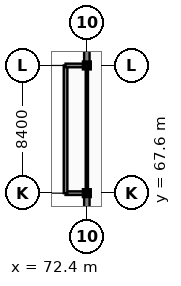
"""IFC4 building model, lengths in metres.
Left out: names, types, materials, properties, quantities, classifications, styles, units other than length and angle.
Written with IfcOpenShell. Run it as: python <this file> out.ifc"""

import sys

from ifc_helpers import new_model, si_unit, direction, frame, frame_2d, origin, origin_2d, place, context, subcontext, project, spatial, rectangle, extrude, element, fill, save


model = new_model("IFC4")
c1 = context("Model", 3, precision=1e-05, world=origin(), true_north=direction((0.0, 1.0)))
c2 = subcontext(c1, "Body", "Model", "MODEL_VIEW")
j1 = project(units=[si_unit("LENGTHUNIT", "METRE"), si_unit("PLANEANGLEUNIT", "RADIAN")], contexts=[c1])
p1 = place(None, origin())
s1 = spatial("IfcSite", under=j1, at=p1, CompositionType="ELEMENT")
p2 = place(p1, origin())
s2 = spatial("IfcBuilding", under=s1, at=p2, CompositionType="ELEMENT")
p3 = place(p2, frame((0.0, 0.0, 13.8)))
s3 = spatial("IfcBuildingStorey", under=s2, at=p3, CompositionType="ELEMENT", Elevation=13.8)
for number, where, z_axis, x_axis in (
    (1, (72.4, 67.6, 0.0), (0.0, 0.0, 1.0), (1.0, 0.0, 0.0)),
    (2, (72.4, 76.0, 0.0), (0.0, 0.0, 1.0), (1.0, 0.0, 0.0)),
):
    element("IfcColumn", number, at=place(p3, frame(where, z_axis=z_axis, x_axis=x_axis)), inside=s3, PredefinedType="COLUMN", context=c2, shape_type="SweptSolid", body=[
        extrude(rectangle(XDim=0.36, YDim=0.36, at=origin_2d()), origin(), (0.0, 0.0, 1.0), 3.9),
    ])
p4 = place(p3, frame((72.4, 67.6, 0.0), z_axis=(0.0, 0.0, 1.0), x_axis=(0.0, 1.0, 0.0)))
e3 = element("IfcWall", 3, at=p4, inside=s3, PredefinedType="PARTITIONING", context=c2, shape_type="SweptSolid", body=[
    extrude(rectangle(XDim=8.4, YDim=0.15, at=frame_2d((4.2, 0.0))), origin(), (0.0, 0.0, 1.0), 3.2),
])
p5 = place(p4, frame((3.7, 0.0, -0.01)))
e4 = element("IfcOpeningElement", 4, at=p5, cuts=e3, PredefinedType="OPENING", context=c2, shape_type="SweptSolid", body=[
    extrude(rectangle(XDim=1.0, YDim=2.16, at=frame_2d((0.5, 1.08))), frame((0.0, 0.085, 0.0), z_axis=(0.0, -1.0, 0.0), x_axis=(1.0, 0.0, 0.0)), (0.0, 0.0, 1.0), 0.17),
])
p6 = place(p3, frame((72.4, 67.6, 0.0), z_axis=(0.0, 0.0, 1.0), x_axis=(0.0, -1.0, 0.0)))
e5 = element("IfcWall", 5, at=p6, inside=s3, PredefinedType="SOLIDWALL", context=c2, shape_type="SweptSolid", body=[
    extrude(rectangle(XDim=8.4, YDim=0.36, at=frame_2d((4.2, 0.0))), origin(), (0.0, 0.0, 1.0), 3.2),
])
p7 = place(p6, frame((0.46, 0.0, 0.75)))
e6 = element("IfcOpeningElement", 6, at=p7, cuts=e5, PredefinedType="OPENING", context=c2, shape_type="SweptSolid", body=[
    extrude(rectangle(XDim=1.55, YDim=2.31, at=frame_2d((0.775, 1.155))), frame((0.0, 0.19, 0.0), z_axis=(0.0, -1.0, 0.0), x_axis=(1.0, 0.0, 0.0)), (0.0, 0.0, 1.0), 0.38),
])
p8 = place(p6, frame((6.26, 0.0, 0.75)))
e7 = element("IfcOpeningElement", 7, at=p8, cuts=e5, PredefinedType="OPENING", context=c2, shape_type="SweptSolid", body=[
    extrude(rectangle(XDim=1.55, YDim=2.31, at=frame_2d((0.775, 1.155))), frame((0.0, 0.19, 0.0), z_axis=(0.0, -1.0, 0.0), x_axis=(1.0, 0.0, 0.0)), (0.0, 0.0, 1.0), 0.38),
])
p9 = place(p3, frame((72.4, 80.8, 0.0), z_axis=(0.0, 0.0, 1.0), x_axis=(0.0, -1.0, 0.0)))
e8 = element("IfcWall", 8, at=p9, inside=s3, PredefinedType="SOLIDWALL", context=c2, shape_type="SweptSolid", body=[
    extrude(rectangle(XDim=4.8, YDim=0.36, at=frame_2d((2.4, 0.0))), origin(), (0.0, 0.0, 1.0), 3.2),
])
p10 = place(p9, frame((0.46, 0.0, 0.75)))
e9 = element("IfcOpeningElement", 9, at=p10, cuts=e8, PredefinedType="OPENING", context=c2, shape_type="SweptSolid", body=[
    extrude(rectangle(XDim=1.55, YDim=2.31, at=frame_2d((0.775, 1.155))), frame((0.0, 0.19, 0.0), z_axis=(0.0, -1.0, 0.0), x_axis=(1.0, 0.0, 0.0)), (0.0, 0.0, 1.0), 0.38),
])
p11 = place(p9, frame((2.66, 0.0, 0.75)))
e10 = element("IfcOpeningElement", 10, at=p11, cuts=e8, PredefinedType="OPENING", context=c2, shape_type="SweptSolid", body=[
    extrude(rectangle(XDim=1.55, YDim=2.31, at=frame_2d((0.775, 1.155))), frame((0.0, 0.19, 0.0), z_axis=(0.0, -1.0, 0.0), x_axis=(1.0, 0.0, 0.0)), (0.0, 0.0, 1.0), 0.38),
])
p12 = place(p3, frame((72.25, 67.6, 0.0), z_axis=(0.0, 0.0, 1.0), x_axis=(-1.0, 0.0, 0.0)))
e11 = element("IfcWall", 11, at=p12, inside=s3, PredefinedType="SOLIDWALL", context=c2, shape_type="SweptSolid", body=[
    extrude(rectangle(XDim=1.25, YDim=0.24, at=frame_2d((0.625, 0.0))), origin(), (0.0, 0.0, 1.0), 3.2),
])
p13 = place(p3, frame((71.0, 67.6, 0.0), z_axis=(0.0, 0.0, 1.0), x_axis=(0.0, 1.0, 0.0)))
e12 = element("IfcWall", 12, at=p13, inside=s3, PredefinedType="SOLIDWALL", context=c2, shape_type="SweptSolid", body=[
    extrude(rectangle(XDim=8.4, YDim=0.24, at=frame_2d((4.2, 0.0))), origin(), (0.0, 0.0, 1.0), 3.2),
])
p14 = place(p13, frame((0.46, 0.0, 0.65)))
e13 = element("IfcOpeningElement", 13, at=p14, cuts=e12, PredefinedType="OPENING", context=c2, shape_type="SweptSolid", body=[
    extrude(rectangle(XDim=2.4, YDim=2.15, at=frame_2d((1.2, 1.075))), frame((0.0, 0.13, 0.0), z_axis=(0.0, -1.0, 0.0), x_axis=(1.0, 0.0, 0.0)), (0.0, 0.0, 1.0), 0.26),
])
p15 = place(p13, frame((5.46, 0.0, 0.65)))
e14 = element("IfcOpeningElement", 14, at=p15, cuts=e12, PredefinedType="OPENING", context=c2, shape_type="SweptSolid", body=[
    extrude(rectangle(XDim=2.4, YDim=2.15, at=frame_2d((1.2, 1.075))), frame((0.0, 0.13, 0.0), z_axis=(0.0, -1.0, 0.0), x_axis=(1.0, 0.0, 0.0)), (0.0, 0.0, 1.0), 0.26),
])
p16 = place(p3, frame((71.0, 76.0, 0.0), z_axis=(0.0, 0.0, 1.0), x_axis=(1.0, 0.0, 0.0)))
e15 = element("IfcWall", 15, at=p16, inside=s3, PredefinedType="SOLIDWALL", context=c2, shape_type="SweptSolid", body=[
    extrude(rectangle(XDim=1.25, YDim=0.24, at=frame_2d((0.625, 0.0))), origin(), (0.0, 0.0, 1.0), 3.2),
])
p17 = place(p5, frame((1.0, 0.0, 0.01), z_axis=(0.0, 0.0, 1.0), x_axis=(-1.0, 0.0, 0.0)))
e16 = element("IfcDoor", 16, at=p17, inside=s3, OperationType="SINGLE_SWING_LEFT", PredefinedType="DOOR", context=c2, shape_type="SweptSolid", body=[
    extrude(rectangle(XDim=1.0, YDim=2.15, at=frame_2d((0.5, 1.075))), frame((0.0, 0.025, 0.0), z_axis=(0.0, -1.0, 0.0), x_axis=(1.0, 0.0, 0.0)), (0.0, 0.0, 1.0), 0.05),
])
fill(e4, e16)
p18 = place(p7, origin())
e17 = element("IfcWindow", 17, at=p18, inside=s3, PartitioningType="DOUBLE_PANEL_HORIZONTAL", PredefinedType="WINDOW", context=c2, shape_type="SweptSolid", body=[
    extrude(rectangle(XDim=1.55, YDim=2.31, at=frame_2d((0.775, 1.155))), frame((0.0, 0.03, 0.0), z_axis=(0.0, -1.0, 0.0), x_axis=(1.0, 0.0, 0.0)), (0.0, 0.0, 1.0), 0.06),
])
fill(e6, e17)
p19 = place(p11, origin())
e18 = element("IfcWindow", 18, at=p19, inside=s3, PartitioningType="DOUBLE_PANEL_HORIZONTAL", PredefinedType="WINDOW", context=c2, shape_type="SweptSolid", body=[
    extrude(rectangle(XDim=1.55, YDim=2.31, at=frame_2d((0.775, 1.155))), frame((0.0, 0.03, 0.0), z_axis=(0.0, -1.0, 0.0), x_axis=(1.0, 0.0, 0.0)), (0.0, 0.0, 1.0), 0.06),
])
fill(e10, e18)
p20 = place(p14, origin())
e19 = element("IfcWindow", 19, at=p20, inside=s3, PartitioningType="TRIPLE_PANEL_VERTICAL", PredefinedType="WINDOW", context=c2, shape_type="SweptSolid", body=[
    extrude(rectangle(XDim=2.4, YDim=2.15, at=frame_2d((1.2, 1.075))), frame((0.0, 0.03, 0.0), z_axis=(0.0, -1.0, 0.0), x_axis=(1.0, 0.0, 0.0)), (0.0, 0.0, 1.0), 0.06),
])
fill(e13, e19)
p21 = place(p15, origin())
e20 = element("IfcWindow", 20, at=p21, inside=s3, PartitioningType="TRIPLE_PANEL_VERTICAL", PredefinedType="WINDOW", context=c2, shape_type="SweptSolid", body=[
    extrude(rectangle(XDim=2.4, YDim=2.15, at=frame_2d((1.2, 1.075))), frame((0.0, 0.03, 0.0), z_axis=(0.0, -1.0, 0.0), x_axis=(1.0, 0.0, 0.0)), (0.0, 0.0, 1.0), 0.06),
])
fill(e14, e20)
save(model, sys.argv[1])
